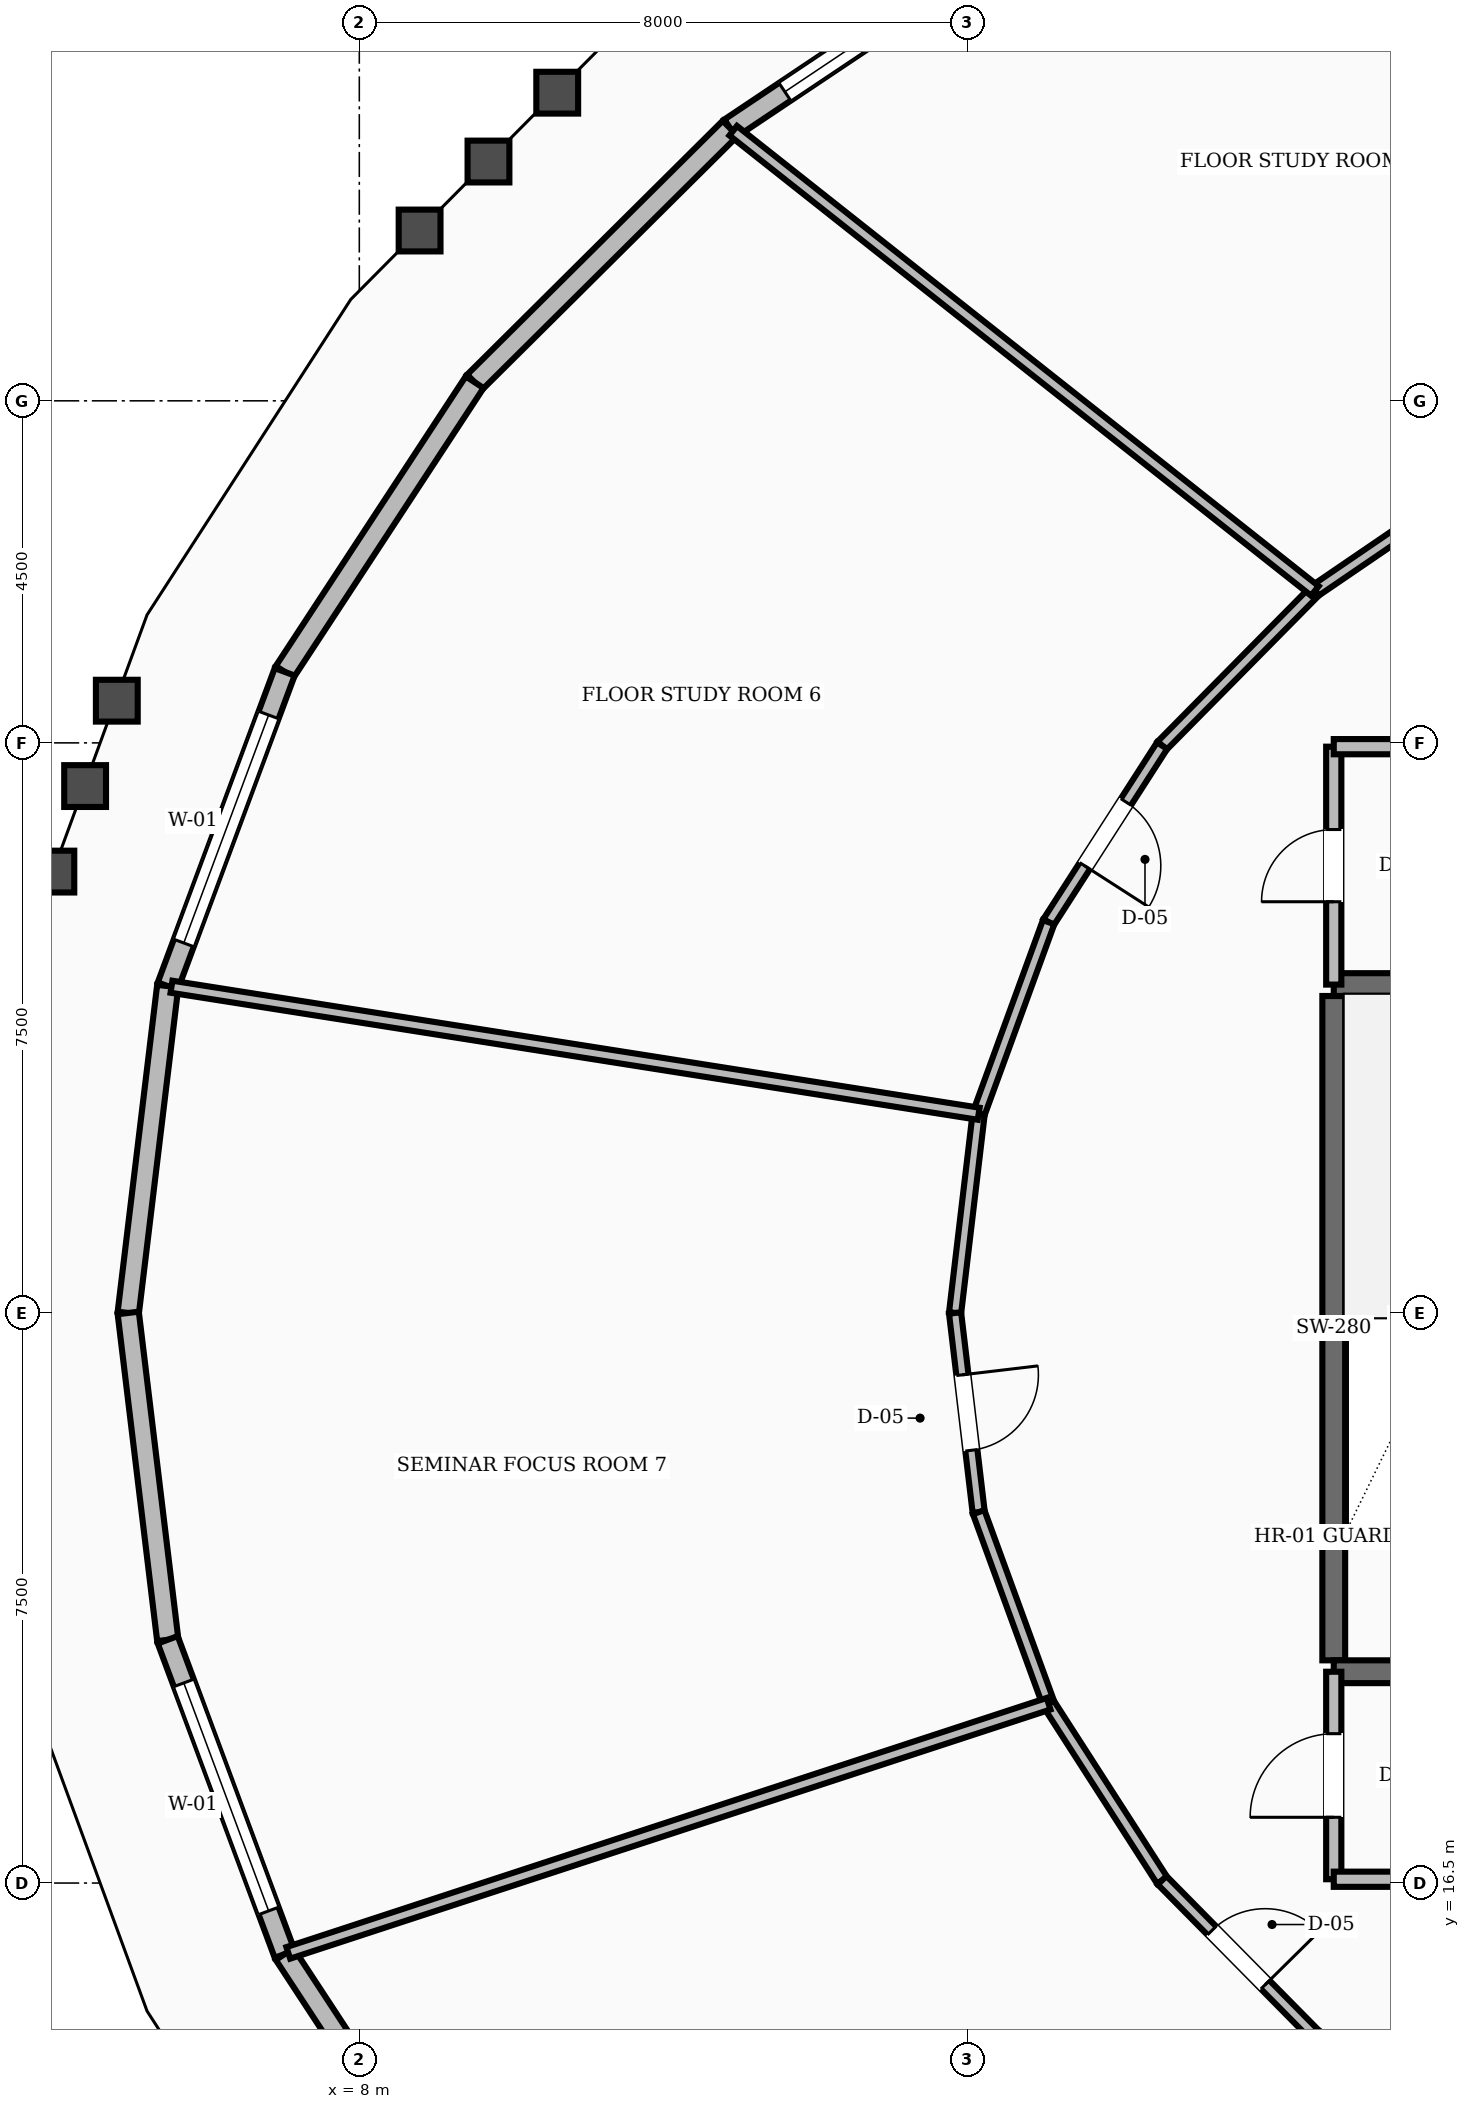
"""IFC4 building model, lengths in metres.
Left out: names, types, materials, properties, quantities, classifications, styles, units other than length and angle.
Written with IfcOpenShell. Run it as: python <this file> out.ifc"""

import sys

from ifc_helpers import new_model, si_unit, direction, frame, frame_2d, origin, place, context, subcontext, project, spatial, rectangle, extrude, element, fill, save


model = new_model("IFC4")
c1 = context("Model", 3, precision=1e-05, world=origin(), true_north=direction((0.0, 1.0)))
c2 = subcontext(c1, "Body", "Model", "MODEL_VIEW")
j1 = project(units=[si_unit("LENGTHUNIT", "METRE"), si_unit("PLANEANGLEUNIT", "RADIAN")], contexts=[c1])
p1 = place(None, origin())
s1 = spatial("IfcSite", under=j1, at=p1, CompositionType="ELEMENT")
p2 = place(p1, origin())
s2 = spatial("IfcBuilding", under=s1, at=p2, CompositionType="ELEMENT")
p3 = place(p2, frame((0.0, 0.0, 80.8)))
s3 = spatial("IfcBuildingStorey", under=s2, at=p3, CompositionType="ELEMENT", Elevation=80.8)
p4 = place(p3, frame((20.82, 19.43, 0.0), z_axis=(0.0, 0.0, 1.0), x_axis=(0.0, 1.0, 0.0)))
e1 = element("IfcWall", 1, at=p4, inside=s3, PredefinedType="SHEAR", context=c2, shape_type="SweptSolid", body=[
    extrude(rectangle(XDim=8.74, YDim=0.3, at=frame_2d((4.37, 0.0))), origin(), (0.0, 0.0, 1.0), 3.6),
])
p5 = place(p3, frame((20.82, 19.28, 0.0), z_axis=(0.0, 0.0, 1.0), x_axis=(1.0, 0.0, 0.0)))
e2 = element("IfcWall", 2, at=p5, inside=s3, PredefinedType="SHEAR", context=c2, shape_type="SweptSolid", body=[
    extrude(rectangle(XDim=3.6, YDim=0.3, at=frame_2d((1.8, 0.0))), origin(), (0.0, 0.0, 1.0), 3.6),
])
p6 = place(p5, frame((1.3, 0.0, 0.0)))
e3 = element("IfcOpeningElement", 3, at=p6, cuts=e2, PredefinedType="OPENING", context=c2, shape_type="SweptSolid", body=[
    extrude(rectangle(XDim=1.1, YDim=2.1, at=frame_2d((0.55, 1.05))), frame((0.0, 0.16, 0.0), z_axis=(0.0, -1.0, 0.0), x_axis=(1.0, 0.0, 0.0)), (0.0, 0.0, 1.0), 0.32),
])
p7 = place(p3, frame((20.82, 28.32, 0.0), z_axis=(0.0, 0.0, 1.0), x_axis=(1.0, 0.0, 0.0)))
e4 = element("IfcWall", 4, at=p7, inside=s3, PredefinedType="SHEAR", context=c2, shape_type="SweptSolid", body=[
    extrude(rectangle(XDim=3.6, YDim=0.3, at=frame_2d((1.8, 0.0))), origin(), (0.0, 0.0, 1.0), 3.6),
])
p8 = place(p3, frame((16.977, 42.326, 0.0), z_axis=(0.0, 0.0, 1.0), x_axis=(-0.831173050052, -0.556013813558, 0.0)))
e5 = element("IfcWall", 5, at=p8, inside=s3, PredefinedType="STANDARD", context=c2, shape_type="SweptSolid", body=[
    extrude(rectangle(XDim=4.93, YDim=0.28, at=frame_2d((2.465, 0.0))), origin(), (0.0, 0.0, 1.0), 2.71),
])
p9 = place(p8, frame((0.865, 0.0, 0.8)))
e6 = element("IfcOpeningElement", 6, at=p9, cuts=e5, PredefinedType="OPENING", context=c2, shape_type="SweptSolid", body=[
    extrude(rectangle(XDim=3.2, YDim=1.65, at=frame_2d((1.6, 0.825))), frame((0.0, 0.15, 0.0), z_axis=(0.0, -1.0, 0.0), x_axis=(1.0, 0.0, 0.0)), (0.0, 0.0, 1.0), 0.3),
])
p10 = place(p3, frame((12.88, 39.585, 0.0), z_axis=(0.0, 0.0, 1.0), x_axis=(-0.709523691603, -0.704681581322, 0.0)))
e7 = element("IfcWall", 7, at=p10, inside=s3, PredefinedType="STANDARD", context=c2, shape_type="SweptSolid", body=[
    extrude(rectangle(XDim=4.74, YDim=0.28, at=frame_2d((2.37, 0.0))), origin(), (0.0, 0.0, 1.0), 2.71),
])
p11 = place(p3, frame((9.517, 36.245, 0.0), z_axis=(0.0, 0.0, 1.0), x_axis=(-0.54836617539, -0.83623832589, 0.0)))
e8 = element("IfcWall", 8, at=p11, inside=s3, PredefinedType="STANDARD", context=c2, shape_type="SweptSolid", body=[
    extrude(rectangle(XDim=4.557, YDim=0.28, at=frame_2d((2.278, 0.0))), origin(), (0.0, 0.0, 1.0), 2.71),
])
p12 = place(p3, frame((7.018, 32.434, 0.0), z_axis=(0.0, 0.0, 1.0), x_axis=(-0.348811713435, -0.93719282358, 0.0)))
e9 = element("IfcWall", 9, at=p12, inside=s3, PredefinedType="STANDARD", context=c2, shape_type="SweptSolid", body=[
    extrude(rectangle(XDim=4.412, YDim=0.28, at=frame_2d((2.206, 0.0))), origin(), (0.0, 0.0, 1.0), 2.71),
])
p13 = place(p12, frame((0.606, 0.0, 0.8)))
e10 = element("IfcOpeningElement", 10, at=p13, cuts=e9, PredefinedType="OPENING", context=c2, shape_type="SweptSolid", body=[
    extrude(rectangle(XDim=3.2, YDim=1.65, at=frame_2d((1.6, 0.825))), frame((0.0, 0.15, 0.0), z_axis=(0.0, -1.0, 0.0), x_axis=(1.0, 0.0, 0.0)), (0.0, 0.0, 1.0), 0.3),
])
for number, where, z_axis, x_axis in (
    (11, (5.479, 28.3, 0.0), (0.0, 0.0, 1.0), (-0.12, -0.993, 0.0)),
    (12, (4.96, 24.0, 0.0), (0.0, 0.0, 1.0), (0.12, -0.993, 0.0)),
):
    element("IfcWall", number, at=place(p3, frame(where, z_axis=z_axis, x_axis=x_axis)), inside=s3, PredefinedType="STANDARD", context=c2, shape_type="SweptSolid", body=[
        extrude(rectangle(XDim=4.331, YDim=0.28, at=frame_2d((2.166, 0.0))), origin(), (0.0, 0.0, 1.0), 2.71),
    ])
p14 = place(p3, frame((5.479, 19.7, 0.0), z_axis=(0.0, 0.0, 1.0), x_axis=(0.348811713435, -0.93719282358, 0.0)))
e13 = element("IfcWall", 13, at=p14, inside=s3, PredefinedType="STANDARD", context=c2, shape_type="SweptSolid", body=[
    extrude(rectangle(XDim=4.412, YDim=0.28, at=frame_2d((2.206, 0.0))), origin(), (0.0, 0.0, 1.0), 2.71),
])
p15 = place(p14, frame((0.606, 0.0, 0.8)))
e14 = element("IfcOpeningElement", 14, at=p15, cuts=e13, PredefinedType="OPENING", context=c2, shape_type="SweptSolid", body=[
    extrude(rectangle(XDim=3.2, YDim=1.65, at=frame_2d((1.6, 0.825))), frame((0.0, 0.15, 0.0), z_axis=(0.0, -1.0, 0.0), x_axis=(1.0, 0.0, 0.0)), (0.0, 0.0, 1.0), 0.3),
])
p16 = place(p3, frame((7.018, 15.566, 0.0), z_axis=(0.0, 0.0, 1.0), x_axis=(0.54836617539, -0.83623832589, 0.0)))
e15 = element("IfcWall", 15, at=p16, inside=s3, PredefinedType="STANDARD", context=c2, shape_type="SweptSolid", body=[
    extrude(rectangle(XDim=4.557, YDim=0.28, at=frame_2d((2.278, 0.0))), origin(), (0.0, 0.0, 1.0), 2.71),
])
p17 = place(p3, frame((20.82, 16.55, 0.0), z_axis=(0.0, 0.0, 1.0), x_axis=(0.0, 1.0, 0.0)))
e16 = element("IfcWall", 16, at=p17, inside=s3, PredefinedType="SOLIDWALL", context=c2, shape_type="SweptSolid", body=[
    extrude(rectangle(XDim=2.73, YDim=0.2, at=frame_2d((1.365, 0.0))), origin(), (0.0, 0.0, 1.0), 2.71),
])
p18 = place(p17, frame((0.815, 0.0, 0.0)))
e17 = element("IfcOpeningElement", 17, at=p18, cuts=e16, PredefinedType="OPENING", context=c2, shape_type="SweptSolid", body=[
    extrude(rectangle(XDim=1.1, YDim=2.1, at=frame_2d((0.55, 1.05))), frame((0.0, 0.11, 0.0), z_axis=(0.0, -1.0, 0.0), x_axis=(1.0, 0.0, 0.0)), (0.0, 0.0, 1.0), 0.22),
])
p19 = place(p3, frame((20.82, 16.55, 0.0), z_axis=(0.0, 0.0, 1.0), x_axis=(1.0, 0.0, 0.0)))
e18 = element("IfcWall", 18, at=p19, inside=s3, PredefinedType="SOLIDWALL", context=c2, shape_type="SweptSolid", body=[
    extrude(rectangle(XDim=3.98, YDim=0.2, at=frame_2d((1.99, 0.0))), origin(), (0.0, 0.0, 1.0), 2.71),
])
p20 = place(p3, frame((20.82, 28.32, 0.0), z_axis=(0.0, 0.0, 1.0), x_axis=(0.0, 1.0, 0.0)))
e19 = element("IfcWall", 19, at=p20, inside=s3, PredefinedType="SOLIDWALL", context=c2, shape_type="SweptSolid", body=[
    extrude(rectangle(XDim=3.13, YDim=0.2, at=frame_2d((1.565, 0.0))), origin(), (0.0, 0.0, 1.0), 2.71),
])
p21 = place(p20, frame((1.09, 0.0, 0.0)))
e20 = element("IfcOpeningElement", 20, at=p21, cuts=e19, PredefinedType="OPENING", context=c2, shape_type="SweptSolid", body=[
    extrude(rectangle(XDim=0.95, YDim=2.1, at=frame_2d((0.475, 1.05))), frame((0.0, 0.11, 0.0), z_axis=(0.0, -1.0, 0.0), x_axis=(1.0, 0.0, 0.0)), (0.0, 0.0, 1.0), 0.22),
])
p22 = place(p3, frame((20.82, 31.45, 0.0), z_axis=(0.0, 0.0, 1.0), x_axis=(1.0, 0.0, 0.0)))
e21 = element("IfcWall", 21, at=p22, inside=s3, PredefinedType="SOLIDWALL", context=c2, shape_type="SweptSolid", body=[
    extrude(rectangle(XDim=3.98, YDim=0.2, at=frame_2d((1.99, 0.0))), origin(), (0.0, 0.0, 1.0), 2.71),
])
p23 = place(p3, frame((23.021, 35.17, 0.0), z_axis=(0.0, 0.0, 1.0), x_axis=(-0.826112340767, -0.563505457323, 0.0)))
e22 = element("IfcWall", 22, at=p23, inside=s3, PredefinedType="SOLIDWALL", context=c2, shape_type="SweptSolid", body=[
    extrude(rectangle(XDim=2.965, YDim=0.16, at=frame_2d((1.482, 0.0))), origin(), (0.0, 0.0, 1.0), 2.71),
])
p24 = place(p3, frame((20.572, 33.499, 0.0), z_axis=(0.0, 0.0, 1.0), x_axis=(-0.702569520063, -0.711615113301, 0.0)))
e23 = element("IfcWall", 23, at=p24, inside=s3, PredefinedType="SOLIDWALL", context=c2, shape_type="SweptSolid", body=[
    extrude(rectangle(XDim=2.861, YDim=0.16, at=frame_2d((1.43, 0.0))), origin(), (0.0, 0.0, 1.0), 2.71),
])
p25 = place(p3, frame((18.562, 31.463, 0.0), z_axis=(0.0, 0.0, 1.0), x_axis=(-0.540891657444, -0.841092274907, 0.0)))
e24 = element("IfcWall", 24, at=p25, inside=s3, PredefinedType="SOLIDWALL", context=c2, shape_type="SweptSolid", body=[
    extrude(rectangle(XDim=2.761, YDim=0.16, at=frame_2d((1.38, 0.0))), origin(), (0.0, 0.0, 1.0), 2.71),
])
p26 = place(p25, frame((0.881, 0.0, 0.0)))
e25 = element("IfcOpeningElement", 25, at=p26, cuts=e24, PredefinedType="OPENING", context=c2, shape_type="SweptSolid", body=[
    extrude(rectangle(XDim=1.0, YDim=2.1, at=frame_2d((0.5, 1.05))), frame((0.0, 0.09, 0.0), z_axis=(0.0, -1.0, 0.0), x_axis=(1.0, 0.0, 0.0)), (0.0, 0.0, 1.0), 0.18),
])
p27 = place(p3, frame((17.068, 29.141, 0.0), z_axis=(0.0, 0.0, 1.0), x_axis=(-0.342882618672, -0.939378257047, 0.0)))
e26 = element("IfcWall", 26, at=p27, inside=s3, PredefinedType="SOLIDWALL", context=c2, shape_type="SweptSolid", body=[
    extrude(rectangle(XDim=2.683, YDim=0.16, at=frame_2d((1.341, 0.0))), origin(), (0.0, 0.0, 1.0), 2.71),
])
p28 = place(p3, frame((16.148, 26.621, 0.0), z_axis=(0.0, 0.0, 1.0), x_axis=(-0.117667763342, -0.993053018459, 0.0)))
e27 = element("IfcWall", 27, at=p28, inside=s3, PredefinedType="SOLIDWALL", context=c2, shape_type="SweptSolid", body=[
    extrude(rectangle(XDim=2.639, YDim=0.16, at=frame_2d((1.32, 0.0))), origin(), (0.0, 0.0, 1.0), 2.71),
])
p29 = place(p3, frame((15.838, 24.0, 0.0), z_axis=(0.0, 0.0, 1.0), x_axis=(0.117667763342, -0.993053018459, 0.0)))
e28 = element("IfcWall", 28, at=p29, inside=s3, PredefinedType="SOLIDWALL", context=c2, shape_type="SweptSolid", body=[
    extrude(rectangle(XDim=2.639, YDim=0.16, at=frame_2d((1.32, 0.0))), origin(), (0.0, 0.0, 1.0), 2.71),
])
p30 = place(p29, frame((0.82, 0.0, 0.0)))
e29 = element("IfcOpeningElement", 29, at=p30, cuts=e28, PredefinedType="OPENING", context=c2, shape_type="SweptSolid", body=[
    extrude(rectangle(XDim=1.0, YDim=2.1, at=frame_2d((0.5, 1.05))), frame((0.0, 0.09, 0.0), z_axis=(0.0, -1.0, 0.0), x_axis=(1.0, 0.0, 0.0)), (0.0, 0.0, 1.0), 0.18),
])
p31 = place(p3, frame((16.148, 21.379, 0.0), z_axis=(0.0, 0.0, 1.0), x_axis=(0.342882618672, -0.939378257047, 0.0)))
e30 = element("IfcWall", 30, at=p31, inside=s3, PredefinedType="SOLIDWALL", context=c2, shape_type="SweptSolid", body=[
    extrude(rectangle(XDim=2.683, YDim=0.16, at=frame_2d((1.341, 0.0))), origin(), (0.0, 0.0, 1.0), 2.71),
])
p32 = place(p3, frame((17.068, 18.859, 0.0), z_axis=(0.0, 0.0, 1.0), x_axis=(0.540891657444, -0.841092274907, 0.0)))
e31 = element("IfcWall", 31, at=p32, inside=s3, PredefinedType="SOLIDWALL", context=c2, shape_type="SweptSolid", body=[
    extrude(rectangle(XDim=2.761, YDim=0.16, at=frame_2d((1.38, 0.0))), origin(), (0.0, 0.0, 1.0), 2.71),
])
p33 = place(p3, frame((18.562, 16.537, 0.0), z_axis=(0.0, 0.0, 1.0), x_axis=(0.702569520063, -0.711615113301, 0.0)))
e32 = element("IfcWall", 32, at=p33, inside=s3, PredefinedType="SOLIDWALL", context=c2, shape_type="SweptSolid", body=[
    extrude(rectangle(XDim=2.861, YDim=0.16, at=frame_2d((1.43, 0.0))), origin(), (0.0, 0.0, 1.0), 2.71),
])
p34 = place(p33, frame((0.93, 0.0, 0.0)))
e33 = element("IfcOpeningElement", 33, at=p34, cuts=e32, PredefinedType="OPENING", context=c2, shape_type="SweptSolid", body=[
    extrude(rectangle(XDim=1.0, YDim=2.1, at=frame_2d((0.5, 1.05))), frame((0.0, 0.09, 0.0), z_axis=(0.0, -1.0, 0.0), x_axis=(1.0, 0.0, 0.0)), (0.0, 0.0, 1.0), 0.18),
])
p35 = place(p3, frame((20.572, 14.501, 0.0), z_axis=(0.0, 0.0, 1.0), x_axis=(0.826112340767, -0.563505457323, 0.0)))
e34 = element("IfcWall", 34, at=p35, inside=s3, PredefinedType="SOLIDWALL", context=c2, shape_type="SweptSolid", body=[
    extrude(rectangle(XDim=2.965, YDim=0.16, at=frame_2d((1.482, 0.0))), origin(), (0.0, 0.0, 1.0), 2.71),
])
p36 = place(p3, frame((20.572, 33.499, 0.0), z_axis=(0.0, 0.0, 1.0), x_axis=(-0.784247697802, 0.62044786122, 0.0)))
e35 = element("IfcWall", 35, at=p36, inside=s3, PredefinedType="SOLIDWALL", context=c2, shape_type="SweptSolid", body=[
    extrude(rectangle(XDim=9.758, YDim=0.16, at=frame_2d((4.879, 0.0))), origin(), (0.0, 0.0, 1.0), 2.71),
])
p37 = place(p3, frame((16.148, 26.621, 0.0), z_axis=(0.0, 0.0, 1.0), x_axis=(-0.987843119508, 0.155454080811, 0.0)))
e36 = element("IfcWall", 36, at=p37, inside=s3, PredefinedType="SOLIDWALL", context=c2, shape_type="SweptSolid", body=[
    extrude(rectangle(XDim=10.75, YDim=0.16, at=frame_2d((5.375, 0.0))), origin(), (0.0, 0.0, 1.0), 2.71),
])
p38 = place(p3, frame((17.068, 18.859, 0.0), z_axis=(0.0, 0.0, 1.0), x_axis=(-0.950282996708, -0.311387581909, 0.0)))
e37 = element("IfcWall", 37, at=p38, inside=s3, PredefinedType="SOLIDWALL", context=c2, shape_type="SweptSolid", body=[
    extrude(rectangle(XDim=10.526, YDim=0.16, at=frame_2d((5.263, 0.0))), origin(), (0.0, 0.0, 1.0), 2.71),
])
p39 = place(p9, origin())
e38 = element("IfcWindow", 38, at=p39, inside=s3, PartitioningType="SINGLE_PANEL", PredefinedType="WINDOW", context=c2, shape_type="SweptSolid", body=[
    extrude(rectangle(XDim=3.2, YDim=1.65, at=frame_2d((1.6, 0.825))), frame((0.0, 0.03, 0.0), z_axis=(0.0, -1.0, 0.0), x_axis=(1.0, 0.0, 0.0)), (0.0, 0.0, 1.0), 0.06),
])
fill(e6, e38)
p40 = place(p13, origin())
e39 = element("IfcWindow", 39, at=p40, inside=s3, PartitioningType="SINGLE_PANEL", PredefinedType="WINDOW", context=c2, shape_type="SweptSolid", body=[
    extrude(rectangle(XDim=3.2, YDim=1.65, at=frame_2d((1.6, 0.825))), frame((0.0, 0.03, 0.0), z_axis=(0.0, -1.0, 0.0), x_axis=(1.0, 0.0, 0.0)), (0.0, 0.0, 1.0), 0.06),
])
fill(e10, e39)
p41 = place(p15, origin())
e40 = element("IfcWindow", 40, at=p41, inside=s3, PartitioningType="SINGLE_PANEL", PredefinedType="WINDOW", context=c2, shape_type="SweptSolid", body=[
    extrude(rectangle(XDim=3.2, YDim=1.65, at=frame_2d((1.6, 0.825))), frame((0.0, 0.03, 0.0), z_axis=(0.0, -1.0, 0.0), x_axis=(1.0, 0.0, 0.0)), (0.0, 0.0, 1.0), 0.06),
])
fill(e14, e40)
p42 = place(p18, origin())
e41 = element("IfcDoor", 41, at=p42, inside=s3, OperationType="SINGLE_SWING_LEFT", PredefinedType="DOOR", context=c2, shape_type="SweptSolid", body=[
    extrude(rectangle(XDim=1.1, YDim=2.1, at=frame_2d((0.55, 1.05))), frame((0.0, 0.025, 0.0), z_axis=(0.0, -1.0, 0.0), x_axis=(1.0, 0.0, 0.0)), (0.0, 0.0, 1.0), 0.05),
])
fill(e17, e41)
p43 = place(p21, origin())
e42 = element("IfcDoor", 42, at=p43, inside=s3, OperationType="SINGLE_SWING_LEFT", PredefinedType="DOOR", context=c2, shape_type="SweptSolid", body=[
    extrude(rectangle(XDim=0.95, YDim=2.1, at=frame_2d((0.475, 1.05))), frame((0.0, 0.025, 0.0), z_axis=(0.0, -1.0, 0.0), x_axis=(1.0, 0.0, 0.0)), (0.0, 0.0, 1.0), 0.05),
])
fill(e20, e42)
p44 = place(p26, origin())
e43 = element("IfcDoor", 43, at=p44, inside=s3, OperationType="SINGLE_SWING_RIGHT", PredefinedType="DOOR", context=c2, shape_type="SweptSolid", body=[
    extrude(rectangle(XDim=1.0, YDim=2.1, at=frame_2d((0.5, 1.05))), frame((0.0, 0.025, 0.0), z_axis=(0.0, -1.0, 0.0), x_axis=(1.0, 0.0, 0.0)), (0.0, 0.0, 1.0), 0.05),
])
fill(e25, e43)
p45 = place(p30, origin())
e44 = element("IfcDoor", 44, at=p45, inside=s3, OperationType="SINGLE_SWING_LEFT", PredefinedType="DOOR", context=c2, shape_type="SweptSolid", body=[
    extrude(rectangle(XDim=1.0, YDim=2.1, at=frame_2d((0.5, 1.05))), frame((0.0, 0.025, 0.0), z_axis=(0.0, -1.0, 0.0), x_axis=(1.0, 0.0, 0.0)), (0.0, 0.0, 1.0), 0.05),
])
fill(e29, e44)
p46 = place(p34, origin())
e45 = element("IfcDoor", 45, at=p46, inside=s3, OperationType="SINGLE_SWING_RIGHT", PredefinedType="DOOR", context=c2, shape_type="SweptSolid", body=[
    extrude(rectangle(XDim=1.0, YDim=2.1, at=frame_2d((0.5, 1.05))), frame((0.0, 0.025, 0.0), z_axis=(0.0, -1.0, 0.0), x_axis=(1.0, 0.0, 0.0)), (0.0, 0.0, 1.0), 0.05),
])
fill(e33, e45)
save(model, sys.argv[1])
